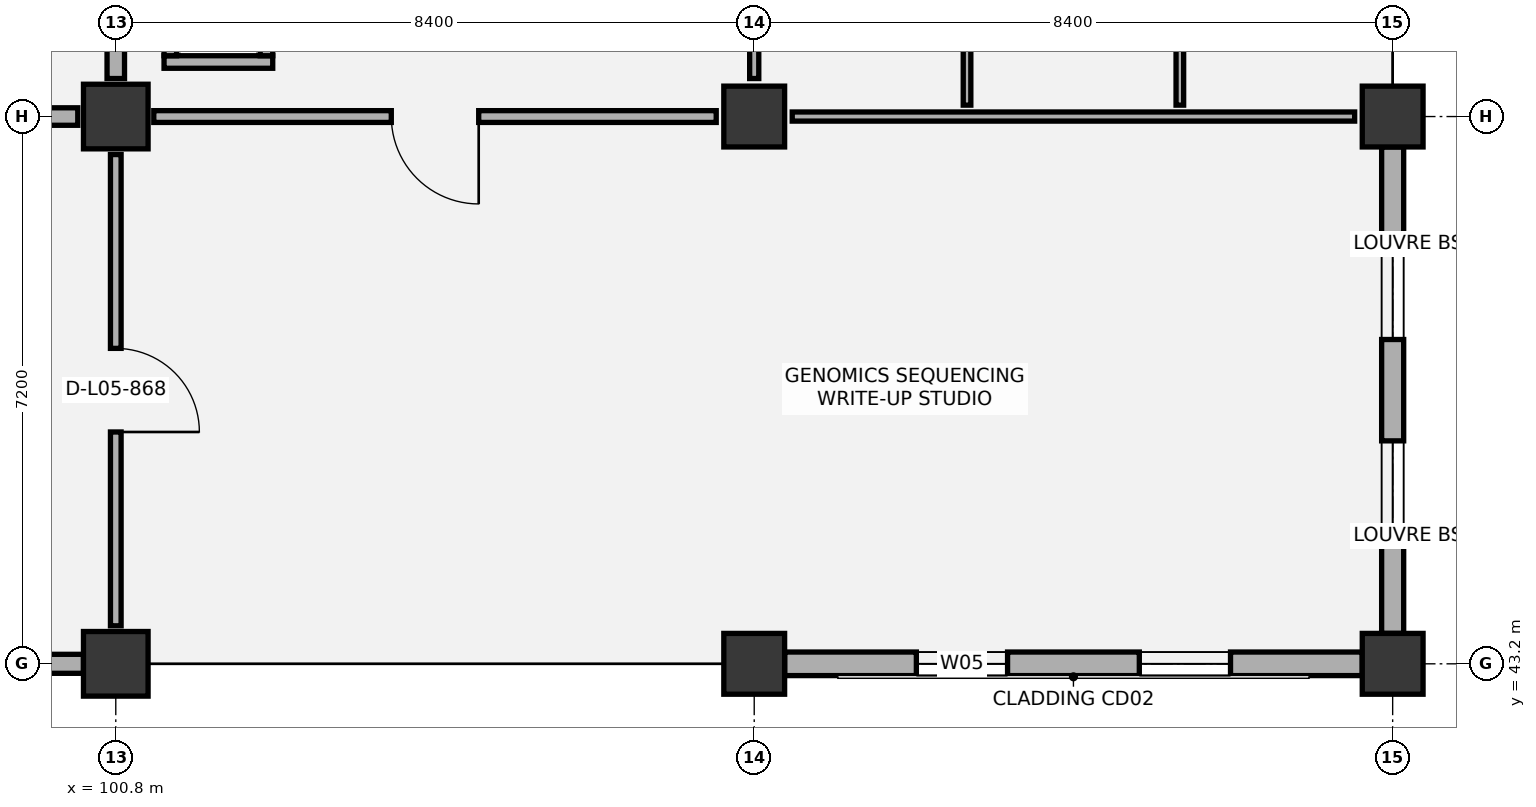
"""IFC4 building model, lengths in metres.
Left out: names, types, materials, properties, quantities, classifications, styles, units other than length and angle.
Written with IfcOpenShell. Run it as: python <this file> out.ifc"""

import sys

from ifc_helpers import new_model, si_unit, direction, frame, frame_2d, origin, origin_2d, place, context, subcontext, project, spatial, rectangle, extrude, element, fill, save


model = new_model("IFC4")
c1 = context("Model", 3, precision=1e-05, world=origin(), true_north=direction((0.0, 1.0)))
c2 = subcontext(c1, "Body", "Model", "MODEL_VIEW")
j1 = project(units=[si_unit("LENGTHUNIT", "METRE"), si_unit("PLANEANGLEUNIT", "RADIAN")], contexts=[c1])
p1 = place(None, origin())
s1 = spatial("IfcSite", under=j1, at=p1, CompositionType="ELEMENT")
p2 = place(p1, origin())
s2 = spatial("IfcBuilding", under=s1, at=p2, CompositionType="ELEMENT")
p3 = place(p2, frame((0.0, 0.0, 27.0)))
s3 = spatial("IfcBuildingStorey", under=s2, at=p3, CompositionType="ELEMENT", Elevation=27.0)
for number, where, z_axis, x_axis in (
    (1, (100.8, 43.2, 0.0), (0.0, 0.0, 1.0), (1.0, 0.0, 0.0)),
    (2, (100.8, 50.4, 0.0), (0.0, 0.0, 1.0), (1.0, 0.0, 0.0)),
):
    element("IfcColumn", number, at=place(p3, frame(where, z_axis=z_axis, x_axis=x_axis)), inside=s3, PredefinedType="COLUMN", context=c2, shape_type="SweptSolid", body=[
        extrude(rectangle(XDim=0.85, YDim=0.85, at=origin_2d()), origin(), (0.0, 0.0, 1.0), 4.2),
    ])
for number, where, z_axis, x_axis in (
    (3, (109.2, 43.2, 0.0), (0.0, 0.0, 1.0), (1.0, 0.0, 0.0)),
    (4, (109.2, 50.4, 0.0), (0.0, 0.0, 1.0), (1.0, 0.0, 0.0)),
    (5, (117.6, 43.2, 0.0), (0.0, 0.0, 1.0), (1.0, 0.0, 0.0)),
    (6, (117.6, 50.4, 0.0), (0.0, 0.0, 1.0), (1.0, 0.0, 0.0)),
):
    element("IfcColumn", number, at=place(p3, frame(where, z_axis=z_axis, x_axis=x_axis)), inside=s3, PredefinedType="COLUMN", context=c2, shape_type="SweptSolid", body=[
        extrude(rectangle(XDim=0.8, YDim=0.8, at=origin_2d()), origin(), (0.0, 0.0, 1.0), 4.2),
    ])
p4 = place(p3, frame((92.8, 43.2, 0.0), z_axis=(0.0, 0.0, 1.0), x_axis=(1.0, 0.0, 0.0)))
e7 = element("IfcWall", 7, at=p4, inside=s3, PredefinedType="SOLIDWALL", context=c2, shape_type="SweptSolid", body=[
    extrude(rectangle(XDim=7.575, YDim=0.25, at=frame_2d((3.788, 0.0))), origin(), (0.0, 0.0, 1.0), 3.365),
])
p5 = place(p4, frame((1.025, 0.0, 0.9)))
e8 = element("IfcOpeningElement", 8, at=p5, cuts=e7, PredefinedType="OPENING", context=c2, shape_type="SweptSolid", body=[
    extrude(rectangle(XDim=2.25, YDim=1.95, at=frame_2d((1.125, 0.975))), frame((0.0, 0.135, 0.0), z_axis=(0.0, -1.0, 0.0), x_axis=(1.0, 0.0, 0.0)), (0.0, 0.0, 1.0), 0.27),
])
p6 = place(p4, frame((4.3, 0.0, 0.9)))
e9 = element("IfcOpeningElement", 9, at=p6, cuts=e7, PredefinedType="OPENING", context=c2, shape_type="SweptSolid", body=[
    extrude(rectangle(XDim=2.25, YDim=1.95, at=frame_2d((1.125, 0.975))), frame((0.0, 0.135, 0.0), z_axis=(0.0, -1.0, 0.0), x_axis=(1.0, 0.0, 0.0)), (0.0, 0.0, 1.0), 0.27),
])
p7 = place(p3, frame((109.6, 43.2, 0.0), z_axis=(0.0, 0.0, 1.0), x_axis=(1.0, 0.0, 0.0)))
e10 = element("IfcWall", 10, at=p7, inside=s3, PredefinedType="SOLIDWALL", context=c2, shape_type="SweptSolid", body=[
    extrude(rectangle(XDim=7.6, YDim=0.31, at=frame_2d((3.8, 0.0))), origin(), (0.0, 0.0, 1.0), 3.365),
])
p8 = place(p7, frame((1.733, 0.0, 0.9)))
e11 = element("IfcOpeningElement", 11, at=p8, cuts=e10, PredefinedType="OPENING", context=c2, shape_type="SweptSolid", body=[
    extrude(rectangle(XDim=1.2, YDim=1.8, at=frame_2d((0.6, 0.9))), frame((0.0, 0.165, 0.0), z_axis=(0.0, -1.0, 0.0), x_axis=(1.0, 0.0, 0.0)), (0.0, 0.0, 1.0), 0.33),
])
p9 = place(p7, frame((4.667, 0.0, 0.9)))
e12 = element("IfcOpeningElement", 12, at=p9, cuts=e10, PredefinedType="OPENING", context=c2, shape_type="SweptSolid", body=[
    extrude(rectangle(XDim=1.2, YDim=1.8, at=frame_2d((0.6, 0.9))), frame((0.0, 0.165, 0.0), z_axis=(0.0, -1.0, 0.0), x_axis=(1.0, 0.0, 0.0)), (0.0, 0.0, 1.0), 0.33),
])
p10 = place(p3, frame((117.6, 43.6, 0.0), z_axis=(0.0, 0.0, 1.0), x_axis=(0.0, 1.0, 0.0)))
e13 = element("IfcWall", 13, at=p10, inside=s3, PredefinedType="SOLIDWALL", context=c2, shape_type="SweptSolid", body=[
    extrude(rectangle(XDim=6.4, YDim=0.29, at=frame_2d((3.2, 0.0))), origin(), (0.0, 0.0, 1.0), 3.365),
])
p11 = place(p10, frame((1.333, 0.0, 0.9)))
e14 = element("IfcOpeningElement", 14, at=p11, cuts=e13, PredefinedType="OPENING", context=c2, shape_type="SweptSolid", body=[
    extrude(rectangle(XDim=1.2, YDim=1.8, at=frame_2d((0.6, 0.9))), frame((0.0, 0.155, 0.0), z_axis=(0.0, -1.0, 0.0), x_axis=(1.0, 0.0, 0.0)), (0.0, 0.0, 1.0), 0.31),
])
p12 = place(p10, frame((3.867, 0.0, 0.9)))
e15 = element("IfcOpeningElement", 15, at=p12, cuts=e13, PredefinedType="OPENING", context=c2, shape_type="SweptSolid", body=[
    extrude(rectangle(XDim=1.2, YDim=1.8, at=frame_2d((0.6, 0.9))), frame((0.0, 0.155, 0.0), z_axis=(0.0, -1.0, 0.0), x_axis=(1.0, 0.0, 0.0)), (0.0, 0.0, 1.0), 0.31),
])
p13 = place(p3, frame((101.435, 51.117, 0.0), z_axis=(0.0, 0.0, 1.0), x_axis=(1.0, 0.0, 0.0)))
e16 = element("IfcWall", 16, at=p13, inside=s3, PredefinedType="PARTITIONING", context=c2, shape_type="SweptSolid", body=[
    extrude(rectangle(XDim=1.43, YDim=0.165, at=frame_2d((0.715, 0.0))), origin(), (0.0, 0.0, 1.0), 3.92),
])
for number, where, z_axis, x_axis in (
    (17, (101.518, 51.2, 0.0), (0.0, 0.0, 1.0), (0.0, 1.0, 0.0)),
    (18, (102.782, 51.2, 0.0), (0.0, 0.0, 1.0), (0.0, 1.0, 0.0)),
):
    element("IfcWall", number, at=place(p3, frame(where, z_axis=z_axis, x_axis=x_axis)), inside=s3, PredefinedType="PARTITIONING", context=c2, shape_type="SweptSolid", body=[
        extrude(rectangle(XDim=0.8, YDim=0.165, at=frame_2d((0.4, 0.0))), origin(), (0.0, 0.0, 1.0), 3.92),
    ])
for number, where, z_axis, x_axis in (
    (19, (112.0, 50.55, 0.0), (0.0, 0.0, 1.0), (0.0, 1.0, 0.0)),
    (20, (114.8, 50.55, 0.0), (0.0, 0.0, 1.0), (0.0, 1.0, 0.0)),
):
    element("IfcWall", number, at=place(p3, frame(where, z_axis=z_axis, x_axis=x_axis)), inside=s3, PredefinedType="PARTITIONING", context=c2, shape_type="SweptSolid", body=[
        extrude(rectangle(XDim=4.59, YDim=0.1, at=frame_2d((2.295, 0.0))), origin(), (0.0, 0.0, 1.0), 3.92),
    ])
p14 = place(p3, frame((100.8, 43.7, 0.0), z_axis=(0.0, 0.0, 1.0), x_axis=(0.0, 1.0, 0.0)))
e21 = element("IfcWall", 21, at=p14, inside=s3, PredefinedType="PARTITIONING", context=c2, shape_type="SweptSolid", body=[
    extrude(rectangle(XDim=6.2, YDim=0.14, at=frame_2d((3.1, 0.0))), origin(), (0.0, 0.0, 1.0), 3.265),
])
p15 = place(p14, frame((2.55, 0.0, 0.0)))
e22 = element("IfcOpeningElement", 22, at=p15, cuts=e21, PredefinedType="OPENING", context=c2, shape_type="SweptSolid", body=[
    extrude(rectangle(XDim=1.1, YDim=2.1, at=frame_2d((0.55, 1.05))), frame((0.0, 0.08, 0.0), z_axis=(0.0, -1.0, 0.0), x_axis=(1.0, 0.0, 0.0)), (0.0, 0.0, 1.0), 0.16),
])
p16 = place(p3, frame((92.9, 50.4, 0.0), z_axis=(0.0, 0.0, 1.0), x_axis=(1.0, 0.0, 0.0)))
e23 = element("IfcWall", 23, at=p16, inside=s3, PredefinedType="PARTITIONING", context=c2, shape_type="SweptSolid", body=[
    extrude(rectangle(XDim=7.4, YDim=0.23, at=frame_2d((3.7, 0.0))), origin(), (0.0, 0.0, 1.0), 3.565),
])
p17 = place(p16, frame((2.95, 0.0, 0.0)))
e24 = element("IfcOpeningElement", 24, at=p17, cuts=e23, PredefinedType="OPENING", context=c2, shape_type="SweptSolid", body=[
    extrude(rectangle(XDim=1.5, YDim=2.15, at=frame_2d((0.75, 1.075))), frame((0.0, 0.125, 0.0), z_axis=(0.0, -1.0, 0.0), x_axis=(1.0, 0.0, 0.0)), (0.0, 0.0, 1.0), 0.25),
])
p18 = place(p3, frame((100.8, 50.9, 0.0), z_axis=(0.0, 0.0, 1.0), x_axis=(0.0, 1.0, 0.0)))
e25 = element("IfcWall", 25, at=p18, inside=s3, PredefinedType="PARTITIONING", context=c2, shape_type="SweptSolid", body=[
    extrude(rectangle(XDim=6.2, YDim=0.23, at=frame_2d((3.1, 0.0))), origin(), (0.0, 0.0, 1.0), 3.515),
])
p19 = place(p3, frame((101.3, 50.4, 0.0), z_axis=(0.0, 0.0, 1.0), x_axis=(1.0, 0.0, 0.0)))
e26 = element("IfcWall", 26, at=p19, inside=s3, PredefinedType="PARTITIONING", context=c2, shape_type="SweptSolid", body=[
    extrude(rectangle(XDim=7.4, YDim=0.155, at=frame_2d((3.7, 0.0))), origin(), (0.0, 0.0, 1.0), 3.625),
])
p20 = place(p19, frame((3.125, 0.0, 0.0)))
e27 = element("IfcOpeningElement", 27, at=p20, cuts=e26, PredefinedType="OPENING", context=c2, shape_type="SweptSolid", body=[
    extrude(rectangle(XDim=1.15, YDim=2.1, at=frame_2d((0.575, 1.05))), frame((0.0, 0.087, 0.0), z_axis=(0.0, -1.0, 0.0), x_axis=(1.0, 0.0, 0.0)), (0.0, 0.0, 1.0), 0.175),
])
p21 = place(p3, frame((109.2, 50.9, 0.0), z_axis=(0.0, 0.0, 1.0), x_axis=(0.0, 1.0, 0.0)))
e28 = element("IfcWall", 28, at=p21, inside=s3, PredefinedType="PARTITIONING", context=c2, shape_type="SweptSolid", body=[
    extrude(rectangle(XDim=6.2, YDim=0.12, at=frame_2d((3.1, 0.0))), origin(), (0.0, 0.0, 1.0), 3.265),
])
p22 = place(p3, frame((109.7, 50.4, 0.0), z_axis=(0.0, 0.0, 1.0), x_axis=(1.0, 0.0, 0.0)))
e29 = element("IfcWall", 29, at=p22, inside=s3, PredefinedType="PARTITIONING", context=c2, shape_type="SweptSolid", body=[
    extrude(rectangle(XDim=7.4, YDim=0.12, at=frame_2d((3.7, 0.0))), origin(), (0.0, 0.0, 1.0), 3.215),
])
p23 = place(p8, origin())
e30 = element("IfcWindow", 30, at=p23, inside=s3, PartitioningType="SINGLE_PANEL", PredefinedType="WINDOW", context=c2, shape_type="SweptSolid", body=[
    extrude(rectangle(XDim=1.2, YDim=1.8, at=frame_2d((0.6, 0.9))), frame((0.0, 0.03, 0.0), z_axis=(0.0, -1.0, 0.0), x_axis=(1.0, 0.0, 0.0)), (0.0, 0.0, 1.0), 0.06),
])
fill(e11, e30)
p24 = place(p9, origin())
e31 = element("IfcWindow", 31, at=p24, inside=s3, PartitioningType="SINGLE_PANEL", PredefinedType="WINDOW", context=c2, shape_type="SweptSolid", body=[
    extrude(rectangle(XDim=1.2, YDim=1.8, at=frame_2d((0.6, 0.9))), frame((0.0, 0.03, 0.0), z_axis=(0.0, -1.0, 0.0), x_axis=(1.0, 0.0, 0.0)), (0.0, 0.0, 1.0), 0.06),
])
fill(e12, e31)
p25 = place(p11, origin())
e32 = element("IfcWindow", 32, at=p25, inside=s3, PartitioningType="SINGLE_PANEL", PredefinedType="WINDOW", context=c2, shape_type="SweptSolid", body=[
    extrude(rectangle(XDim=1.2, YDim=1.8, at=frame_2d((0.6, 0.9))), frame((0.0, 0.03, 0.0), z_axis=(0.0, -1.0, 0.0), x_axis=(1.0, 0.0, 0.0)), (0.0, 0.0, 1.0), 0.06),
])
fill(e14, e32)
p26 = place(p12, origin())
e33 = element("IfcWindow", 33, at=p26, inside=s3, PartitioningType="SINGLE_PANEL", PredefinedType="WINDOW", context=c2, shape_type="SweptSolid", body=[
    extrude(rectangle(XDim=1.2, YDim=1.8, at=frame_2d((0.6, 0.9))), frame((0.0, 0.03, 0.0), z_axis=(0.0, -1.0, 0.0), x_axis=(1.0, 0.0, 0.0)), (0.0, 0.0, 1.0), 0.06),
])
fill(e15, e33)
p27 = place(p15, frame((1.1, 0.0, 0.0), z_axis=(0.0, 0.0, 1.0), x_axis=(-1.0, 0.0, 0.0)))
e34 = element("IfcDoor", 34, at=p27, inside=s3, OperationType="SINGLE_SWING_RIGHT", PredefinedType="DOOR", context=c2, shape_type="SweptSolid", body=[
    extrude(rectangle(XDim=1.1, YDim=2.1, at=frame_2d((0.55, 1.05))), frame((0.0, 0.025, 0.0), z_axis=(0.0, -1.0, 0.0), x_axis=(1.0, 0.0, 0.0)), (0.0, 0.0, 1.0), 0.05),
])
fill(e22, e34)
p28 = place(p20, frame((1.15, 0.0, 0.0), z_axis=(0.0, 0.0, 1.0), x_axis=(-1.0, 0.0, 0.0)))
e35 = element("IfcDoor", 35, at=p28, inside=s3, OperationType="SINGLE_SWING_LEFT", PredefinedType="DOOR", context=c2, shape_type="SweptSolid", body=[
    extrude(rectangle(XDim=1.15, YDim=2.1, at=frame_2d((0.575, 1.05))), frame((0.0, 0.025, 0.0), z_axis=(0.0, -1.0, 0.0), x_axis=(1.0, 0.0, 0.0)), (0.0, 0.0, 1.0), 0.05),
])
fill(e27, e35)
save(model, sys.argv[1])
